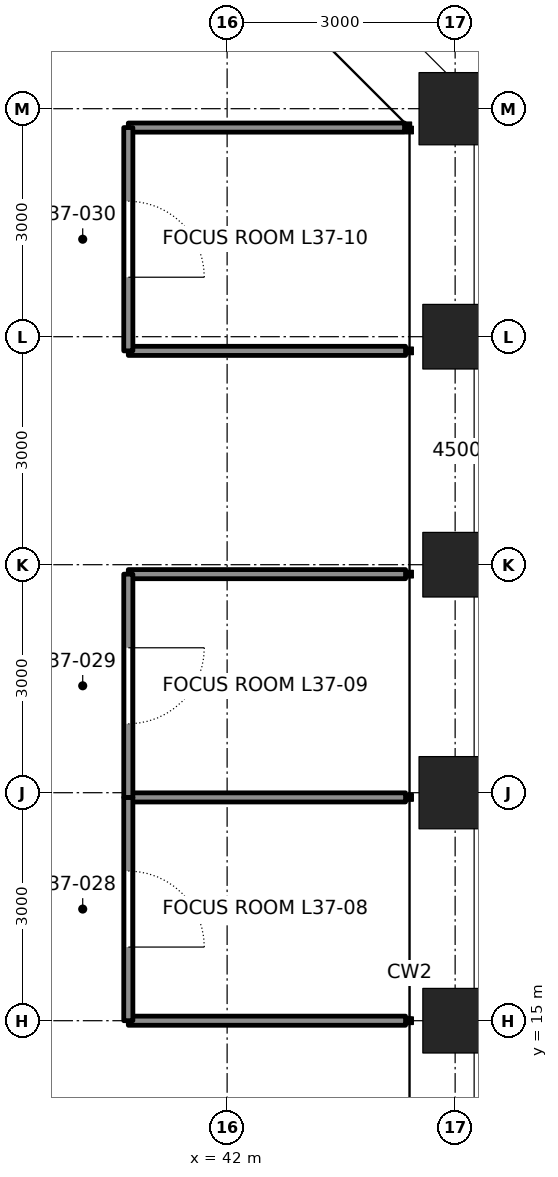
"""IFC4 building model, lengths in metres.
Left out: names, types, materials, properties, quantities, classifications, styles, units other than length and angle.
Written with IfcOpenShell. Run it as: python <this file> out.ifc"""

import sys

from ifc_helpers import new_model, si_unit, direction, frame, frame_2d, origin, origin_2d, place, context, subcontext, project, spatial, rectangle, hollow_rectangle, extrude, element, fill, save


model = new_model("IFC4")
c1 = context("Model", 3, precision=1e-05, world=origin(), true_north=direction((0.0, 1.0)))
c2 = subcontext(c1, "Body", "Model", "MODEL_VIEW")
j1 = project(units=[si_unit("LENGTHUNIT", "METRE"), si_unit("PLANEANGLEUNIT", "RADIAN")], contexts=[c1])
p1 = place(None, origin())
s1 = spatial("IfcSite", under=j1, at=p1, CompositionType="ELEMENT")
p2 = place(p1, origin())
s2 = spatial("IfcBuilding", under=s1, at=p2, CompositionType="ELEMENT")
p3 = place(p2, frame((0.0, 0.0, 169.8)))
s3 = spatial("IfcBuildingStorey", under=s2, at=p3, CompositionType="ELEMENT", Elevation=169.8)
p4 = place(p3, frame((45.0, 15.0, 0.0), z_axis=(0.0, 0.0, 1.0), x_axis=(1.0, 0.0, 0.0)))
e1 = element("IfcColumn", 1, at=p4, inside=s3, PredefinedType="COLUMN", context=c2, shape_type="SweptSolid", body=[
    extrude(hollow_rectangle(XDim=0.85, YDim=0.85, WallThickness=0.085, at=origin_2d()), origin(), (0.0, 0.0, 1.0), 4.2),
])
p5 = place(p3, frame((45.0, 18.0, 0.0), z_axis=(0.0, 0.0, 1.0), x_axis=(1.0, 0.0, 0.0)))
e2 = element("IfcColumn", 2, at=p5, inside=s3, PredefinedType="COLUMN", context=c2, shape_type="SweptSolid", body=[
    extrude(hollow_rectangle(XDim=0.95, YDim=0.95, WallThickness=0.11, at=origin_2d()), origin(), (0.0, 0.0, 1.0), 4.2),
])
for number, where, z_axis, x_axis in (
    (3, (45.0, 21.0, 0.0), (0.0, 0.0, 1.0), (1.0, 0.0, 0.0)),
    (4, (45.0, 24.0, 0.0), (0.0, 0.0, 1.0), (1.0, 0.0, 0.0)),
):
    element("IfcColumn", number, at=place(p3, frame(where, z_axis=z_axis, x_axis=x_axis)), inside=s3, PredefinedType="COLUMN", context=c2, shape_type="SweptSolid", body=[
        extrude(hollow_rectangle(XDim=0.85, YDim=0.85, WallThickness=0.085, at=origin_2d()), origin(), (0.0, 0.0, 1.0), 4.2),
    ])
p6 = place(p3, frame((45.0, 27.0, 0.0), z_axis=(0.0, 0.0, 1.0), x_axis=(1.0, 0.0, 0.0)))
e5 = element("IfcColumn", 5, at=p6, inside=s3, PredefinedType="COLUMN", context=c2, shape_type="SweptSolid", body=[
    extrude(hollow_rectangle(XDim=0.95, YDim=0.95, WallThickness=0.095, at=origin_2d()), origin(), (0.0, 0.0, 1.0), 4.2),
])
for number, where, z_axis, x_axis in (
    (6, (44.347, 15.0, 0.0), (0.0, 0.0, 1.0), (-1.0, 0.0, 0.0)),
    (7, (44.347, 17.938, 0.0), (0.0, 0.0, 1.0), (-1.0, 0.0, 0.0)),
    (8, (44.347, 20.876, 0.0), (0.0, 0.0, 1.0), (-1.0, 0.0, 0.0)),
):
    element("IfcWall", number, at=place(p3, frame(where, z_axis=z_axis, x_axis=x_axis)), inside=s3, PredefinedType="PARTITIONING", context=c2, shape_type="SweptSolid", body=[
        extrude(rectangle(XDim=3.647, YDim=0.12, at=frame_2d((1.824, 0.0))), origin(), (0.0, 0.0, 1.0), 3.278),
    ])
p7 = place(p3, frame((44.347, 23.814, 0.0), z_axis=(0.0, 0.0, 1.0), x_axis=(-1.0, 0.0, 0.0)))
e9 = element("IfcWall", 9, at=p7, inside=s3, PredefinedType="PARTITIONING", context=c2, shape_type="SweptSolid", body=[
    extrude(rectangle(XDim=3.647, YDim=0.12, at=frame_2d((1.824, 0.0))), origin(), (0.0, 0.0, 1.0), 4.04),
])
p8 = place(p3, frame((44.334, 26.751, 0.0), z_axis=(0.0, 0.0, 1.0), x_axis=(-1.0, 0.0, 0.0)))
e10 = element("IfcWall", 10, at=p8, inside=s3, PredefinedType="PARTITIONING", context=c2, shape_type="SweptSolid", body=[
    extrude(rectangle(XDim=3.634, YDim=0.12, at=frame_2d((1.817, 0.0))), origin(), (0.0, 0.0, 1.0), 4.04),
])
p9 = place(p3, frame((40.7, 15.0, 0.0), z_axis=(0.0, 0.0, 1.0), x_axis=(0.0, 1.0, 0.0)))
e11 = element("IfcWall", 11, at=p9, inside=s3, PredefinedType="PARTITIONING", context=c2, shape_type="SweptSolid", body=[
    extrude(rectangle(XDim=2.938, YDim=0.12, at=frame_2d((1.469, 0.0))), origin(), (0.0, 0.0, 1.0), 4.04),
])
p10 = place(p9, frame((0.969, 0.0, 0.0)))
e12 = element("IfcOpeningElement", 12, at=p10, cuts=e11, PredefinedType="OPENING", context=c2, shape_type="SweptSolid", body=[
    extrude(rectangle(XDim=1.0, YDim=2.4, at=frame_2d((0.5, 1.2))), frame((0.0, 0.07, 0.0), z_axis=(0.0, -1.0, 0.0), x_axis=(1.0, 0.0, 0.0)), (0.0, 0.0, 1.0), 0.14),
])
p11 = place(p3, frame((40.7, 17.938, 0.0), z_axis=(0.0, 0.0, 1.0), x_axis=(0.0, 1.0, 0.0)))
e13 = element("IfcWall", 13, at=p11, inside=s3, PredefinedType="PARTITIONING", context=c2, shape_type="SweptSolid", body=[
    extrude(rectangle(XDim=2.938, YDim=0.12, at=frame_2d((1.469, 0.0))), origin(), (0.0, 0.0, 1.0), 4.04),
])
p12 = place(p11, frame((0.969, 0.0, 0.0)))
e14 = element("IfcOpeningElement", 14, at=p12, cuts=e13, PredefinedType="OPENING", context=c2, shape_type="SweptSolid", body=[
    extrude(rectangle(XDim=1.0, YDim=2.4, at=frame_2d((0.5, 1.2))), frame((0.0, 0.07, 0.0), z_axis=(0.0, -1.0, 0.0), x_axis=(1.0, 0.0, 0.0)), (0.0, 0.0, 1.0), 0.14),
])
p13 = place(p3, frame((40.7, 23.814, 0.0), z_axis=(0.0, 0.0, 1.0), x_axis=(0.0, 1.0, 0.0)))
e15 = element("IfcWall", 15, at=p13, inside=s3, PredefinedType="PARTITIONING", context=c2, shape_type="SweptSolid", body=[
    extrude(rectangle(XDim=2.938, YDim=0.12, at=frame_2d((1.469, 0.0))), origin(), (0.0, 0.0, 1.0), 4.04),
])
p14 = place(p13, frame((0.969, 0.0, 0.0)))
e16 = element("IfcOpeningElement", 16, at=p14, cuts=e15, PredefinedType="OPENING", context=c2, shape_type="SweptSolid", body=[
    extrude(rectangle(XDim=1.0, YDim=2.4, at=frame_2d((0.5, 1.2))), frame((0.0, 0.07, 0.0), z_axis=(0.0, -1.0, 0.0), x_axis=(1.0, 0.0, 0.0)), (0.0, 0.0, 1.0), 0.14),
])
p15 = place(p10, frame((1.0, 0.0, 0.0), z_axis=(0.0, 0.0, 1.0), x_axis=(-1.0, 0.0, 0.0)))
e17 = element("IfcDoor", 17, at=p15, inside=s3, OperationType="SINGLE_SWING_RIGHT", PredefinedType="DOOR", context=c2, shape_type="SweptSolid", body=[
    extrude(rectangle(XDim=1.0, YDim=2.4, at=frame_2d((0.5, 1.2))), frame((0.0, 0.025, 0.0), z_axis=(0.0, -1.0, 0.0), x_axis=(1.0, 0.0, 0.0)), (0.0, 0.0, 1.0), 0.05),
])
fill(e12, e17)
p16 = place(p12, frame((1.0, 0.0, 0.0), z_axis=(0.0, 0.0, 1.0), x_axis=(-1.0, 0.0, 0.0)))
e18 = element("IfcDoor", 18, at=p16, inside=s3, OperationType="SINGLE_SWING_LEFT", PredefinedType="DOOR", context=c2, shape_type="SweptSolid", body=[
    extrude(rectangle(XDim=1.0, YDim=2.4, at=frame_2d((0.5, 1.2))), frame((0.0, 0.025, 0.0), z_axis=(0.0, -1.0, 0.0), x_axis=(1.0, 0.0, 0.0)), (0.0, 0.0, 1.0), 0.05),
])
fill(e14, e18)
p17 = place(p14, frame((1.0, 0.0, 0.0), z_axis=(0.0, 0.0, 1.0), x_axis=(-1.0, 0.0, 0.0)))
e19 = element("IfcDoor", 19, at=p17, inside=s3, OperationType="SINGLE_SWING_RIGHT", PredefinedType="DOOR", context=c2, shape_type="SweptSolid", body=[
    extrude(rectangle(XDim=1.0, YDim=2.4, at=frame_2d((0.5, 1.2))), frame((0.0, 0.025, 0.0), z_axis=(0.0, -1.0, 0.0), x_axis=(1.0, 0.0, 0.0)), (0.0, 0.0, 1.0), 0.05),
])
fill(e16, e19)
save(model, sys.argv[1])
